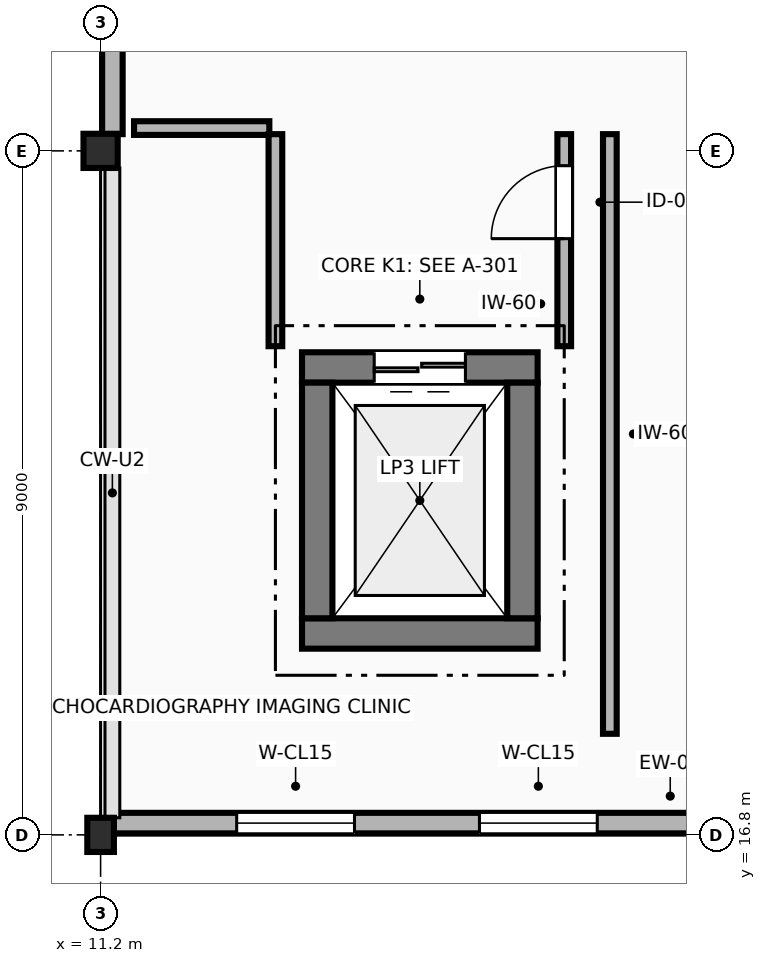
"""IFC4 building model, lengths in metres.
Left out: names, types, materials, properties, quantities, classifications, styles, units other than length and angle.
Written with IfcOpenShell. Run it as: python <this file> out.ifc"""

import sys

from ifc_helpers import new_model, si_unit, direction, frame, frame_2d, origin, origin_2d, place, context, subcontext, project, spatial, rectangle, extrude, element, fill, save


model = new_model("IFC4")
c1 = context("Model", 3, precision=1e-05, world=origin(), true_north=direction((0.0, 1.0)))
c2 = subcontext(c1, "Body", "Model", "MODEL_VIEW")
j1 = project(units=[si_unit("LENGTHUNIT", "METRE"), si_unit("PLANEANGLEUNIT", "RADIAN")], contexts=[c1])
p1 = place(None, origin())
s1 = spatial("IfcSite", under=j1, at=p1, CompositionType="ELEMENT")
p2 = place(p1, origin())
s2 = spatial("IfcBuilding", under=s1, at=p2, CompositionType="ELEMENT")
p3 = place(p2, frame((0.0, 0.0, 13.8)))
s3 = spatial("IfcBuildingStorey", under=s2, at=p3, CompositionType="ELEMENT", Elevation=13.8)
p4 = place(p3, frame((11.2, 16.8, 0.0), z_axis=(0.0, 0.0, 1.0), x_axis=(1.0, 0.0, 0.0)))
e1 = element("IfcColumn", 1, at=p4, inside=s3, PredefinedType="COLUMN", context=c2, shape_type="SweptSolid", body=[
    extrude(rectangle(XDim=0.35, YDim=0.45, at=origin_2d()), origin(), (0.0, 0.0, 1.0), 4.2),
])
p5 = place(p3, frame((11.2, 25.8, 0.0), z_axis=(0.0, 0.0, 1.0), x_axis=(1.0, 0.0, 0.0)))
e2 = element("IfcColumn", 2, at=p5, inside=s3, PredefinedType="COLUMN", context=c2, shape_type="SweptSolid", body=[
    extrude(rectangle(XDim=0.45, YDim=0.45, at=origin_2d()), origin(), (0.0, 0.0, 1.0), 4.2),
])
p6 = place(p3, frame((11.37, 16.955, 0.0), z_axis=(0.0, 0.0, 1.0), x_axis=(1.0, 0.0, 0.0)))
e3 = element("IfcWall", 3, at=p6, inside=s3, PredefinedType="STANDARD", context=c2, shape_type="SweptSolid", body=[
    extrude(rectangle(XDim=7.985, YDim=0.27, at=frame_2d((3.992, 0.0))), origin(), (0.0, 0.0, 1.0), 3.255),
])
p7 = place(p6, frame((1.621, 0.0, 0.95)))
e4 = element("IfcOpeningElement", 4, at=p7, cuts=e3, PredefinedType="OPENING", context=c2, shape_type="SweptSolid", body=[
    extrude(rectangle(XDim=1.55, YDim=1.45, at=frame_2d((0.775, 0.725))), frame((0.0, 0.145, 0.0), z_axis=(0.0, -1.0, 0.0), x_axis=(1.0, 0.0, 0.0)), (0.0, 0.0, 1.0), 0.29),
])
p8 = place(p6, frame((4.814, 0.0, 0.95)))
e5 = element("IfcOpeningElement", 5, at=p8, cuts=e3, PredefinedType="OPENING", context=c2, shape_type="SweptSolid", body=[
    extrude(rectangle(XDim=1.55, YDim=1.45, at=frame_2d((0.775, 0.725))), frame((0.0, 0.145, 0.0), z_axis=(0.0, -1.0, 0.0), x_axis=(1.0, 0.0, 0.0)), (0.0, 0.0, 1.0), 0.29),
])
p9 = place(p3, frame((11.355, 34.355, 0.0), z_axis=(0.0, 0.0, 1.0), x_axis=(0.0, -1.0, 0.0)))
e6 = element("IfcWall", 6, at=p9, inside=s3, PredefinedType="STANDARD", context=c2, shape_type="SweptSolid", body=[
    extrude(rectangle(XDim=8.335, YDim=0.27, at=frame_2d((4.167, 0.0))), origin(), (0.0, 0.0, 1.0), 3.365),
])
p10 = place(p3, frame((13.85, 19.45, 0.0), z_axis=(0.0, 0.0, 1.0), x_axis=(1.0, 0.0, 0.0)))
e7 = element("IfcWall", 7, at=p10, inside=s3, PredefinedType="SHEAR", context=c2, shape_type="SweptSolid", body=[
    extrude(rectangle(XDim=3.1, YDim=0.4, at=frame_2d((1.55, 0.0))), origin(), (0.0, 0.0, 1.0), 4.2),
])
p11 = place(p3, frame((16.95, 22.95, 0.0), z_axis=(0.0, 0.0, 1.0), x_axis=(-1.0, 0.0, 0.0)))
e8 = element("IfcWall", 8, at=p11, inside=s3, PredefinedType="SHEAR", context=c2, shape_type="SweptSolid", body=[
    extrude(rectangle(XDim=3.1, YDim=0.4, at=frame_2d((1.55, 0.0))), origin(), (0.0, 0.0, 1.0), 4.2),
])
p12 = place(p11, frame((0.95, 0.0, 0.0)))
e9 = element("IfcOpeningElement", 9, at=p12, cuts=e8, PredefinedType="OPENING", context=c2, shape_type="SweptSolid", body=[
    extrude(rectangle(XDim=1.2, YDim=2.2, at=frame_2d((0.6, 1.1))), frame((0.0, 0.21, 0.0), z_axis=(0.0, -1.0, 0.0), x_axis=(1.0, 0.0, 0.0)), (0.0, 0.0, 1.0), 0.42),
])
for number, where, z_axis, x_axis in (
    (10, (14.05, 19.65, 0.0), (0.0, 0.0, 1.0), (0.0, 1.0, 0.0)),
    (11, (16.75, 22.75, 0.0), (0.0, 0.0, 1.0), (0.0, -1.0, 0.0)),
):
    element("IfcWall", number, at=place(p3, frame(where, z_axis=z_axis, x_axis=x_axis)), inside=s3, PredefinedType="SHEAR", context=c2, shape_type="SweptSolid", body=[
        extrude(rectangle(XDim=3.1, YDim=0.4, at=frame_2d((1.55, 0.0))), origin(), (0.0, 0.0, 1.0), 4.2),
    ])
p13 = place(p3, frame((17.3, 23.23, 0.0), z_axis=(0.0, 0.0, 1.0), x_axis=(0.0, 1.0, 0.0)))
e12 = element("IfcWall", 12, at=p13, inside=s3, PredefinedType="PARTITIONING", context=c2, shape_type="SweptSolid", body=[
    extrude(rectangle(XDim=2.79, YDim=0.18, at=frame_2d((1.395, 0.0))), origin(), (0.0, 0.0, 1.0), 3.92),
])
p14 = place(p13, frame((1.415, 0.0, 0.0)))
e13 = element("IfcOpeningElement", 13, at=p14, cuts=e12, PredefinedType="OPENING", context=c2, shape_type="SweptSolid", body=[
    extrude(rectangle(XDim=0.96, YDim=2.1, at=frame_2d((0.48, 1.05))), frame((0.0, 0.1, 0.0), z_axis=(0.0, -1.0, 0.0), x_axis=(1.0, 0.0, 0.0)), (0.0, 0.0, 1.0), 0.2),
])
p15 = place(p3, frame((17.9, 26.02, 0.0), z_axis=(0.0, 0.0, 1.0), x_axis=(0.0, -1.0, 0.0)))
e14 = element("IfcWall", 14, at=p15, inside=s3, PredefinedType="PARTITIONING", context=c2, shape_type="SweptSolid", body=[
    extrude(rectangle(XDim=7.89, YDim=0.18, at=frame_2d((3.945, 0.0))), origin(), (0.0, 0.0, 1.0), 3.92),
])
p16 = place(p3, frame((11.64, 26.1, 0.0), z_axis=(0.0, 0.0, 1.0), x_axis=(1.0, 0.0, 0.0)))
e15 = element("IfcWall", 15, at=p16, inside=s3, PredefinedType="PARTITIONING", context=c2, shape_type="SweptSolid", body=[
    extrude(rectangle(XDim=1.78, YDim=0.18, at=frame_2d((0.89, 0.0))), origin(), (0.0, 0.0, 1.0), 3.255),
])
p17 = place(p3, frame((13.5, 26.02, 0.0), z_axis=(0.0, 0.0, 1.0), x_axis=(0.0, -1.0, 0.0)))
e16 = element("IfcWall", 16, at=p17, inside=s3, PredefinedType="PARTITIONING", context=c2, shape_type="SweptSolid", body=[
    extrude(rectangle(XDim=2.79, YDim=0.18, at=frame_2d((1.395, 0.0))), origin(), (0.0, 0.0, 1.0), 3.92),
])
p18 = place(p7, origin())
e17 = element("IfcWindow", 17, at=p18, inside=s3, PartitioningType="SINGLE_PANEL", PredefinedType="WINDOW", context=c2, shape_type="SweptSolid", body=[
    extrude(rectangle(XDim=1.55, YDim=1.45, at=frame_2d((0.775, 0.725))), frame((0.0, 0.03, 0.0), z_axis=(0.0, -1.0, 0.0), x_axis=(1.0, 0.0, 0.0)), (0.0, 0.0, 1.0), 0.06),
])
fill(e4, e17)
p19 = place(p8, origin())
e18 = element("IfcWindow", 18, at=p19, inside=s3, PartitioningType="SINGLE_PANEL", PredefinedType="WINDOW", context=c2, shape_type="SweptSolid", body=[
    extrude(rectangle(XDim=1.55, YDim=1.45, at=frame_2d((0.775, 0.725))), frame((0.0, 0.03, 0.0), z_axis=(0.0, -1.0, 0.0), x_axis=(1.0, 0.0, 0.0)), (0.0, 0.0, 1.0), 0.06),
])
fill(e5, e18)
p20 = place(p12, origin())
e19 = element("IfcDoor", 19, at=p20, inside=s3, OperationType="DOUBLE_DOOR_SLIDING", PredefinedType="DOOR", context=c2, shape_type="SweptSolid", body=[
    extrude(rectangle(XDim=1.2, YDim=2.2, at=frame_2d((0.6, 1.1))), frame((0.0, 0.025, 0.0), z_axis=(0.0, -1.0, 0.0), x_axis=(1.0, 0.0, 0.0)), (0.0, 0.0, 1.0), 0.05),
])
fill(e9, e19)
p21 = place(p14, origin())
e20 = element("IfcDoor", 20, at=p21, inside=s3, OperationType="SINGLE_SWING_LEFT", PredefinedType="DOOR", context=c2, shape_type="SweptSolid", body=[
    extrude(rectangle(XDim=0.96, YDim=2.1, at=frame_2d((0.48, 1.05))), frame((0.0, 0.025, 0.0), z_axis=(0.0, -1.0, 0.0), x_axis=(1.0, 0.0, 0.0)), (0.0, 0.0, 1.0), 0.05),
])
fill(e13, e20)
save(model, sys.argv[1])
